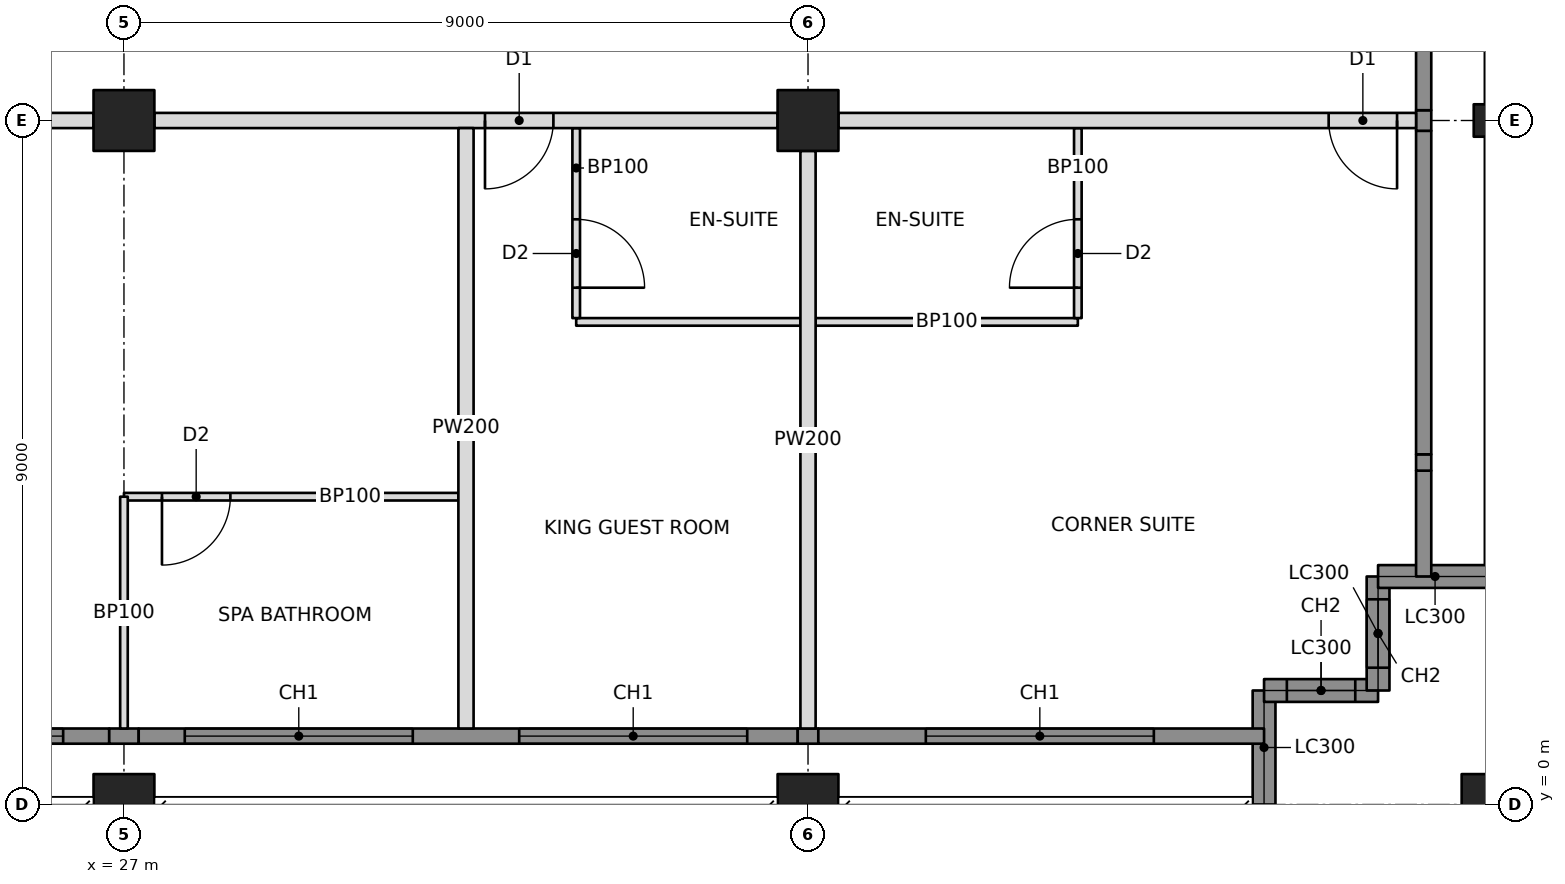
"""IFC4 building model, lengths in metres.
Left out: names, types, materials, properties, quantities, classifications, styles, units other than length and angle.
Written with IfcOpenShell. Run it as: python <this file> out.ifc"""

import sys

from ifc_helpers import new_model, si_unit, direction, frame, frame_2d, origin, origin_2d, place, context, subcontext, project, spatial, rectangle, hollow_rectangle, i_section, extrude, element, fill, save


model = new_model("IFC4")
c1 = context("Model", 3, precision=1e-05, world=origin(), true_north=direction((0.0, 1.0)))
c2 = subcontext(c1, "Body", "Model", "MODEL_VIEW")
j1 = project(units=[si_unit("LENGTHUNIT", "METRE"), si_unit("PLANEANGLEUNIT", "RADIAN")], contexts=[c1])
p1 = place(None, origin())
s1 = spatial("IfcSite", under=j1, at=p1, CompositionType="ELEMENT")
p2 = place(p1, origin())
s2 = spatial("IfcBuilding", under=s1, at=p2, CompositionType="ELEMENT")
p3 = place(p2, frame((0.0, 0.0, 204.6)))
s3 = spatial("IfcBuildingStorey", under=s2, at=p3, CompositionType="ELEMENT", Elevation=204.6)
p4 = place(p3, frame((27.0, 0.0, 0.0), z_axis=(0.0, 0.0, 1.0), x_axis=(1.0, 0.0, 0.0)))
e1 = element("IfcColumn", 1, at=p4, inside=s3, PredefinedType="COLUMN", context=c2, shape_type="SweptSolid", body=[
    extrude(hollow_rectangle(XDim=0.8, YDim=0.8, WallThickness=0.06, at=origin_2d()), origin(), (0.0, 0.0, 1.0), 3.4),
])
p5 = place(p3, frame((27.0, 9.0, 0.0), z_axis=(0.0, 0.0, 1.0), x_axis=(1.0, 0.0, 0.0)))
e2 = element("IfcColumn", 2, at=p5, inside=s3, PredefinedType="COLUMN", context=c2, shape_type="SweptSolid", body=[
    extrude(hollow_rectangle(XDim=0.8, YDim=0.8, WallThickness=0.05, at=origin_2d()), origin(), (0.0, 0.0, 1.0), 3.4),
])
p6 = place(p3, frame((36.0, 0.0, 0.0), z_axis=(0.0, 0.0, 1.0), x_axis=(1.0, 0.0, 0.0)))
e3 = element("IfcColumn", 3, at=p6, inside=s3, PredefinedType="COLUMN", context=c2, shape_type="SweptSolid", body=[
    extrude(hollow_rectangle(XDim=0.8, YDim=0.8, WallThickness=0.06, at=origin_2d()), origin(), (0.0, 0.0, 1.0), 3.4),
])
p7 = place(p3, frame((36.0, 9.0, 0.0), z_axis=(0.0, 0.0, 1.0), x_axis=(0.0, 1.0, 0.0)))
e4 = element("IfcColumn", 4, at=p7, inside=s3, PredefinedType="COLUMN", context=c2, shape_type="SweptSolid", body=[
    extrude(hollow_rectangle(XDim=0.8, YDim=0.8, WallThickness=0.05, at=origin_2d()), origin(), (0.0, 0.0, 1.0), 3.4),
])
p8 = place(p3, frame((45.0, 0.0, 0.0), z_axis=(0.0, 0.0, 1.0), x_axis=(1.0, 0.0, 0.0)))
e5 = element("IfcColumn", 5, at=p8, inside=s3, PredefinedType="COLUMN", context=c2, shape_type="SweptSolid", body=[
    extrude(hollow_rectangle(XDim=0.8, YDim=0.8, WallThickness=0.06, at=origin_2d()), origin(), (0.0, 0.0, 1.0), 3.4),
])
p9 = place(p3, frame((45.0, 9.0, 0.0), z_axis=(0.0, 0.0, 1.0), x_axis=(0.0, 1.0, 0.0)))
e6 = element("IfcColumn", 6, at=p9, inside=s3, PredefinedType="COLUMN", context=c2, shape_type="SweptSolid", body=[
    extrude(i_section(OverallWidth=0.427, OverallDepth=0.483, WebThickness=0.051, FlangeThickness=0.082, at=origin_2d()), origin(), (0.0, 0.0, 1.0), 3.4),
])
p10 = place(p3, frame((42.0, 0.0, 0.0), z_axis=(0.0, 0.0, 1.0), x_axis=(0.0, 1.0, 0.0)))
e7 = element("IfcWall", 7, at=p10, inside=s3, PredefinedType="SOLIDWALL", context=c2, shape_type="SweptSolid", body=[
    extrude(rectangle(XDim=1.5, YDim=0.3, at=frame_2d((0.75, 0.0))), origin(), (0.0, 0.0, 1.0), 2.42),
])
p11 = place(p3, frame((42.0, 1.5, 0.0), z_axis=(0.0, 0.0, 1.0), x_axis=(1.0, 0.0, 0.0)))
e8 = element("IfcWall", 8, at=p11, inside=s3, PredefinedType="SOLIDWALL", context=c2, shape_type="SweptSolid", body=[
    extrude(rectangle(XDim=1.5, YDim=0.3, at=frame_2d((0.75, 0.0))), origin(), (0.0, 0.0, 1.0), 3.2),
])
p12 = place(p11, frame((0.3, 0.0, 0.6)))
e9 = element("IfcOpeningElement", 9, at=p12, cuts=e8, PredefinedType="OPENING", context=c2, shape_type="SweptSolid", body=[
    extrude(rectangle(XDim=0.9, YDim=2.2, at=frame_2d((0.45, 1.1))), frame((0.0, 0.16, 0.0), z_axis=(0.0, -1.0, 0.0), x_axis=(1.0, 0.0, 0.0)), (0.0, 0.0, 1.0), 0.32),
])
p13 = place(p3, frame((43.5, 1.5, 0.0), z_axis=(0.0, 0.0, 1.0), x_axis=(0.0, 1.0, 0.0)))
e10 = element("IfcWall", 10, at=p13, inside=s3, PredefinedType="SOLIDWALL", context=c2, shape_type="SweptSolid", body=[
    extrude(rectangle(XDim=1.5, YDim=0.3, at=frame_2d((0.75, 0.0))), origin(), (0.0, 0.0, 1.0), 3.2),
])
p14 = place(p13, frame((0.3, 0.0, 0.6)))
e11 = element("IfcOpeningElement", 11, at=p14, cuts=e10, PredefinedType="OPENING", context=c2, shape_type="SweptSolid", body=[
    extrude(rectangle(XDim=0.9, YDim=2.2, at=frame_2d((0.45, 1.1))), frame((0.0, 0.16, 0.0), z_axis=(0.0, -1.0, 0.0), x_axis=(1.0, 0.0, 0.0)), (0.0, 0.0, 1.0), 0.32),
])
p15 = place(p3, frame((43.5, 3.0, 0.0), z_axis=(0.0, 0.0, 1.0), x_axis=(1.0, 0.0, 0.0)))
e12 = element("IfcWall", 12, at=p15, inside=s3, PredefinedType="SOLIDWALL", context=c2, shape_type="SweptSolid", body=[
    extrude(rectangle(XDim=1.5, YDim=0.3, at=frame_2d((0.75, 0.0))), origin(), (0.0, 0.0, 1.0), 2.42),
])
p16 = place(p3, frame((44.1, 3.0, 0.0), z_axis=(0.0, 0.0, 1.0), x_axis=(0.0, 1.0, 0.0)))
e13 = element("IfcWall", 13, at=p16, inside=s3, PredefinedType="SOLIDWALL", context=c2, shape_type="SweptSolid", body=[
    extrude(rectangle(XDim=1.393, YDim=0.2, at=frame_2d((0.696, 0.0))), origin(), (0.0, 0.0, 1.0), 3.2),
])
p17 = place(p3, frame((18.4, 9.0, 0.0), z_axis=(0.0, 0.0, 1.0), x_axis=(1.0, 0.0, 0.0)))
e14 = element("IfcWall", 14, at=p17, inside=s3, PredefinedType="PARTITIONING", context=c2, shape_type="SweptSolid", body=[
    extrude(rectangle(XDim=8.2, YDim=0.2, at=frame_2d((4.1, 0.0))), origin(), (0.0, 0.0, 1.0), 2.405),
])
p18 = place(p17, frame((4.35, 0.0, 0.0)))
e15 = element("IfcOpeningElement", 15, at=p18, cuts=e14, PredefinedType="OPENING", context=c2, shape_type="SweptSolid", body=[
    extrude(rectangle(XDim=0.9, YDim=2.1, at=frame_2d((0.45, 1.05))), frame((0.0, 0.11, 0.0), z_axis=(0.0, -1.0, 0.0), x_axis=(1.0, 0.0, 0.0)), (0.0, 0.0, 1.0), 0.22),
])
p19 = place(p3, frame((27.4, 9.0, 0.0), z_axis=(0.0, 0.0, 1.0), x_axis=(1.0, 0.0, 0.0)))
e16 = element("IfcWall", 16, at=p19, inside=s3, PredefinedType="PARTITIONING", context=c2, shape_type="SweptSolid", body=[
    extrude(rectangle(XDim=8.2, YDim=0.2, at=frame_2d((4.1, 0.0))), origin(), (0.0, 0.0, 1.0), 2.405),
])
p20 = place(p19, frame((4.35, 0.0, 0.0)))
e17 = element("IfcOpeningElement", 17, at=p20, cuts=e16, PredefinedType="OPENING", context=c2, shape_type="SweptSolid", body=[
    extrude(rectangle(XDim=0.9, YDim=2.1, at=frame_2d((0.45, 1.05))), frame((0.0, 0.11, 0.0), z_axis=(0.0, -1.0, 0.0), x_axis=(1.0, 0.0, 0.0)), (0.0, 0.0, 1.0), 0.22),
])
p21 = place(p3, frame((36.4, 9.0, 0.0), z_axis=(0.0, 0.0, 1.0), x_axis=(1.0, 0.0, 0.0)))
e18 = element("IfcWall", 18, at=p21, inside=s3, PredefinedType="PARTITIONING", context=c2, shape_type="SweptSolid", body=[
    extrude(rectangle(XDim=7.6, YDim=0.2, at=frame_2d((3.8, 0.0))), origin(), (0.0, 0.0, 1.0), 2.438),
])
p22 = place(p21, frame((6.45, 0.0, 0.0)))
e19 = element("IfcOpeningElement", 19, at=p22, cuts=e18, PredefinedType="OPENING", context=c2, shape_type="SweptSolid", body=[
    extrude(rectangle(XDim=0.9, YDim=2.1, at=frame_2d((0.45, 1.05))), frame((0.0, 0.11, 0.0), z_axis=(0.0, -1.0, 0.0), x_axis=(1.0, 0.0, 0.0)), (0.0, 0.0, 1.0), 0.22),
])
p23 = place(p3, frame((31.5, 8.9, 0.0), z_axis=(0.0, 0.0, 1.0), x_axis=(0.0, -1.0, 0.0)))
e20 = element("IfcWall", 20, at=p23, inside=s3, PredefinedType="PARTITIONING", context=c2, shape_type="SweptSolid", body=[
    extrude(rectangle(XDim=7.9, YDim=0.2, at=frame_2d((3.95, 0.0))), origin(), (0.0, 0.0, 1.0), 2.404),
])
p24 = place(p3, frame((36.0, 8.6, 0.0), z_axis=(0.0, 0.0, 1.0), x_axis=(0.0, -1.0, 0.0)))
e21 = element("IfcWall", 21, at=p24, inside=s3, PredefinedType="PARTITIONING", context=c2, shape_type="SweptSolid", body=[
    extrude(rectangle(XDim=7.6, YDim=0.2, at=frame_2d((3.8, 0.0))), origin(), (0.0, 0.0, 1.0), 2.438),
])
p25 = place(p3, frame((27.0, 4.05, 0.0), z_axis=(0.0, 0.0, 1.0), x_axis=(1.0, 0.0, 0.0)))
e22 = element("IfcWall", 22, at=p25, inside=s3, PredefinedType="PARTITIONING", context=c2, shape_type="SweptSolid", body=[
    extrude(rectangle(XDim=4.4, YDim=0.1, at=frame_2d((2.2, 0.0))), origin(), (0.0, 0.0, 1.0), 2.404),
])
p26 = place(p25, frame((0.5, 0.0, 0.0)))
e23 = element("IfcOpeningElement", 23, at=p26, cuts=e22, PredefinedType="OPENING", context=c2, shape_type="SweptSolid", body=[
    extrude(rectangle(XDim=0.9, YDim=2.1, at=frame_2d((0.45, 1.05))), frame((0.0, 0.06, 0.0), z_axis=(0.0, -1.0, 0.0), x_axis=(1.0, 0.0, 0.0)), (0.0, 0.0, 1.0), 0.12),
])
p27 = place(p3, frame((27.0, 4.05, 0.0), z_axis=(0.0, 0.0, 1.0), x_axis=(0.0, -1.0, 0.0)))
e24 = element("IfcWall", 24, at=p27, inside=s3, PredefinedType="PARTITIONING", context=c2, shape_type="SweptSolid", body=[
    extrude(rectangle(XDim=3.05, YDim=0.1, at=frame_2d((1.525, 0.0))), origin(), (0.0, 0.0, 1.0), 2.405),
])
p28 = place(p3, frame((32.95, 6.35, 0.0), z_axis=(0.0, 0.0, 1.0), x_axis=(1.0, 0.0, 0.0)))
e25 = element("IfcWall", 25, at=p28, inside=s3, PredefinedType="PARTITIONING", context=c2, shape_type="SweptSolid", body=[
    extrude(rectangle(XDim=2.95, YDim=0.1, at=frame_2d((1.475, 0.0))), origin(), (0.0, 0.0, 1.0), 2.438),
])
p29 = place(p3, frame((32.95, 8.9, 0.0), z_axis=(0.0, 0.0, 1.0), x_axis=(0.0, -1.0, 0.0)))
e26 = element("IfcWall", 26, at=p29, inside=s3, PredefinedType="PARTITIONING", context=c2, shape_type="SweptSolid", body=[
    extrude(rectangle(XDim=2.5, YDim=0.1, at=frame_2d((1.25, 0.0))), origin(), (0.0, 0.0, 1.0), 2.404),
])
p30 = place(p29, frame((1.2, 0.0, 0.0)))
e27 = element("IfcOpeningElement", 27, at=p30, cuts=e26, PredefinedType="OPENING", context=c2, shape_type="SweptSolid", body=[
    extrude(rectangle(XDim=0.9, YDim=2.1, at=frame_2d((0.45, 1.05))), frame((0.0, 0.06, 0.0), z_axis=(0.0, -1.0, 0.0), x_axis=(1.0, 0.0, 0.0)), (0.0, 0.0, 1.0), 0.12),
])
p31 = place(p3, frame((36.1, 6.35, 0.0), z_axis=(0.0, 0.0, 1.0), x_axis=(1.0, 0.0, 0.0)))
e28 = element("IfcWall", 28, at=p31, inside=s3, PredefinedType="PARTITIONING", context=c2, shape_type="SweptSolid", body=[
    extrude(rectangle(XDim=3.45, YDim=0.1, at=frame_2d((1.725, 0.0))), origin(), (0.0, 0.0, 1.0), 2.438),
])
p32 = place(p3, frame((39.55, 8.9, 0.0), z_axis=(0.0, 0.0, 1.0), x_axis=(0.0, -1.0, 0.0)))
e29 = element("IfcWall", 29, at=p32, inside=s3, PredefinedType="PARTITIONING", context=c2, shape_type="SweptSolid", body=[
    extrude(rectangle(XDim=2.5, YDim=0.1, at=frame_2d((1.25, 0.0))), origin(), (0.0, 0.0, 1.0), 2.438),
])
p33 = place(p32, frame((1.2, 0.0, 0.0)))
e30 = element("IfcOpeningElement", 30, at=p33, cuts=e29, PredefinedType="OPENING", context=c2, shape_type="SweptSolid", body=[
    extrude(rectangle(XDim=0.9, YDim=2.1, at=frame_2d((0.45, 1.05))), frame((0.0, 0.06, 0.0), z_axis=(0.0, -1.0, 0.0), x_axis=(1.0, 0.0, 0.0)), (0.0, 0.0, 1.0), 0.12),
])
p34 = place(p3, frame((18.194, 0.9, 0.0), z_axis=(0.0, 0.0, 1.0), x_axis=(1.0, 0.0, 0.0)))
e31 = element("IfcWall", 31, at=p34, inside=s3, PredefinedType="SOLIDWALL", context=c2, shape_type="SweptSolid", body=[
    extrude(rectangle(XDim=8.612, YDim=0.2, at=frame_2d((4.306, 0.0))), origin(), (0.0, 0.0, 1.0), 3.2),
])
p35 = place(p34, frame((0.606, 0.0, 0.6)))
e32 = element("IfcOpeningElement", 32, at=p35, cuts=e31, PredefinedType="OPENING", context=c2, shape_type="SweptSolid", body=[
    extrude(rectangle(XDim=3.0, YDim=2.2, at=frame_2d((1.5, 1.1))), frame((0.0, 0.11, 0.0), z_axis=(0.0, -1.0, 0.0), x_axis=(1.0, 0.0, 0.0)), (0.0, 0.0, 1.0), 0.22),
])
p36 = place(p34, frame((5.006, 0.0, 0.6)))
e33 = element("IfcOpeningElement", 33, at=p36, cuts=e31, PredefinedType="OPENING", context=c2, shape_type="SweptSolid", body=[
    extrude(rectangle(XDim=3.0, YDim=2.2, at=frame_2d((1.5, 1.1))), frame((0.0, 0.11, 0.0), z_axis=(0.0, -1.0, 0.0), x_axis=(1.0, 0.0, 0.0)), (0.0, 0.0, 1.0), 0.22),
])
p37 = place(p3, frame((26.806, 0.9, 0.0), z_axis=(0.0, 0.0, 1.0), x_axis=(1.0, 0.0, 0.0)))
e34 = element("IfcWall", 34, at=p37, inside=s3, PredefinedType="SOLIDWALL", context=c2, shape_type="SweptSolid", body=[
    extrude(rectangle(XDim=0.388, YDim=0.2, at=frame_2d((0.194, 0.0))), origin(), (0.0, 0.0, 1.0), 2.404),
])
p38 = place(p3, frame((27.194, 0.9, 0.0), z_axis=(0.0, 0.0, 1.0), x_axis=(1.0, 0.0, 0.0)))
e35 = element("IfcWall", 35, at=p38, inside=s3, PredefinedType="SOLIDWALL", context=c2, shape_type="SweptSolid", body=[
    extrude(rectangle(XDim=8.671, YDim=0.2, at=frame_2d((4.335, 0.0))), origin(), (0.0, 0.0, 1.0), 3.2),
])
p39 = place(p38, frame((0.606, 0.0, 0.6)))
e36 = element("IfcOpeningElement", 36, at=p39, cuts=e35, PredefinedType="OPENING", context=c2, shape_type="SweptSolid", body=[
    extrude(rectangle(XDim=3.0, YDim=2.2, at=frame_2d((1.5, 1.1))), frame((0.0, 0.11, 0.0), z_axis=(0.0, -1.0, 0.0), x_axis=(1.0, 0.0, 0.0)), (0.0, 0.0, 1.0), 0.22),
])
p40 = place(p38, frame((5.006, 0.0, 0.6)))
e37 = element("IfcOpeningElement", 37, at=p40, cuts=e35, PredefinedType="OPENING", context=c2, shape_type="SweptSolid", body=[
    extrude(rectangle(XDim=3.0, YDim=2.2, at=frame_2d((1.5, 1.1))), frame((0.0, 0.11, 0.0), z_axis=(0.0, -1.0, 0.0), x_axis=(1.0, 0.0, 0.0)), (0.0, 0.0, 1.0), 0.22),
])
p41 = place(p3, frame((35.865, 0.9, 0.0), z_axis=(0.0, 0.0, 1.0), x_axis=(1.0, 0.0, 0.0)))
e38 = element("IfcWall", 38, at=p41, inside=s3, PredefinedType="SOLIDWALL", context=c2, shape_type="SweptSolid", body=[
    extrude(rectangle(XDim=0.271, YDim=0.2, at=frame_2d((0.135, 0.0))), origin(), (0.0, 0.0, 1.0), 2.438),
])
p42 = place(p3, frame((36.135, 0.9, 0.0), z_axis=(0.0, 0.0, 1.0), x_axis=(1.0, 0.0, 0.0)))
e39 = element("IfcWall", 39, at=p42, inside=s3, PredefinedType="SOLIDWALL", context=c2, shape_type="SweptSolid", body=[
    extrude(rectangle(XDim=5.865, YDim=0.2, at=frame_2d((2.932, 0.0))), origin(), (0.0, 0.0, 1.0), 3.2),
])
p43 = place(p42, frame((1.415, 0.0, 0.6)))
e40 = element("IfcOpeningElement", 40, at=p43, cuts=e39, PredefinedType="OPENING", context=c2, shape_type="SweptSolid", body=[
    extrude(rectangle(XDim=3.0, YDim=2.2, at=frame_2d((1.5, 1.1))), frame((0.0, 0.11, 0.0), z_axis=(0.0, -1.0, 0.0), x_axis=(1.0, 0.0, 0.0)), (0.0, 0.0, 1.0), 0.22),
])
p44 = place(p3, frame((44.1, 4.393, 0.0), z_axis=(0.0, 0.0, 1.0), x_axis=(0.0, 1.0, 0.0)))
e41 = element("IfcWall", 41, at=p44, inside=s3, PredefinedType="SOLIDWALL", context=c2, shape_type="SweptSolid", body=[
    extrude(rectangle(XDim=0.215, YDim=0.2, at=frame_2d((0.107, 0.0))), origin(), (0.0, 0.0, 1.0), 2.661),
])
p45 = place(p3, frame((44.1, 4.607, 0.0), z_axis=(0.0, 0.0, 1.0), x_axis=(0.0, 1.0, 0.0)))
e42 = element("IfcWall", 42, at=p45, inside=s3, PredefinedType="SOLIDWALL", context=c2, shape_type="SweptSolid", body=[
    extrude(rectangle(XDim=4.257, YDim=0.2, at=frame_2d((2.129, 0.0))), origin(), (0.0, 0.0, 1.0), 3.2),
])
p46 = place(p3, frame((44.1, 8.865, 0.0), z_axis=(0.0, 0.0, 1.0), x_axis=(0.0, 1.0, 0.0)))
e43 = element("IfcWall", 43, at=p46, inside=s3, PredefinedType="SOLIDWALL", context=c2, shape_type="SweptSolid", body=[
    extrude(rectangle(XDim=0.271, YDim=0.2, at=frame_2d((0.135, 0.0))), origin(), (0.0, 0.0, 1.0), 2.438),
])
p47 = place(p3, frame((44.1, 9.135, 0.0), z_axis=(0.0, 0.0, 1.0), x_axis=(0.0, 1.0, 0.0)))
e44 = element("IfcWall", 44, at=p47, inside=s3, PredefinedType="SOLIDWALL", context=c2, shape_type="SweptSolid", body=[
    extrude(rectangle(XDim=8.671, YDim=0.2, at=frame_2d((4.335, 0.0))), origin(), (0.0, 0.0, 1.0), 3.2),
])
p48 = place(p47, frame((2.015, 0.0, 0.6)))
e45 = element("IfcOpeningElement", 45, at=p48, cuts=e44, PredefinedType="OPENING", context=c2, shape_type="SweptSolid", body=[
    extrude(rectangle(XDim=3.0, YDim=2.2, at=frame_2d((1.5, 1.1))), frame((0.0, 0.11, 0.0), z_axis=(0.0, -1.0, 0.0), x_axis=(1.0, 0.0, 0.0)), (0.0, 0.0, 1.0), 0.22),
])
p49 = place(p47, frame((5.515, 0.0, 0.6)))
e46 = element("IfcOpeningElement", 46, at=p49, cuts=e44, PredefinedType="OPENING", context=c2, shape_type="SweptSolid", body=[
    extrude(rectangle(XDim=3.0, YDim=2.2, at=frame_2d((1.5, 1.1))), frame((0.0, 0.11, 0.0), z_axis=(0.0, -1.0, 0.0), x_axis=(1.0, 0.0, 0.0)), (0.0, 0.0, 1.0), 0.22),
])
p50 = place(p12, origin())
e47 = element("IfcWindow", 47, at=p50, inside=s3, PartitioningType="SINGLE_PANEL", PredefinedType="WINDOW", context=c2, shape_type="SweptSolid", body=[
    extrude(rectangle(XDim=0.9, YDim=2.2, at=frame_2d((0.45, 1.1))), frame((0.0, 0.03, 0.0), z_axis=(0.0, -1.0, 0.0), x_axis=(1.0, 0.0, 0.0)), (0.0, 0.0, 1.0), 0.06),
])
fill(e9, e47)
p51 = place(p14, origin())
e48 = element("IfcWindow", 48, at=p51, inside=s3, PartitioningType="SINGLE_PANEL", PredefinedType="WINDOW", context=c2, shape_type="SweptSolid", body=[
    extrude(rectangle(XDim=0.9, YDim=2.2, at=frame_2d((0.45, 1.1))), frame((0.0, 0.03, 0.0), z_axis=(0.0, -1.0, 0.0), x_axis=(1.0, 0.0, 0.0)), (0.0, 0.0, 1.0), 0.06),
])
fill(e11, e48)
p52 = place(p36, origin())
e49 = element("IfcWindow", 49, at=p52, inside=s3, PartitioningType="TRIPLE_PANEL_VERTICAL", PredefinedType="WINDOW", context=c2, shape_type="SweptSolid", body=[
    extrude(rectangle(XDim=3.0, YDim=2.2, at=frame_2d((1.5, 1.1))), frame((0.0, 0.03, 0.0), z_axis=(0.0, -1.0, 0.0), x_axis=(1.0, 0.0, 0.0)), (0.0, 0.0, 1.0), 0.06),
])
fill(e33, e49)
p53 = place(p39, origin())
e50 = element("IfcWindow", 50, at=p53, inside=s3, PartitioningType="TRIPLE_PANEL_VERTICAL", PredefinedType="WINDOW", context=c2, shape_type="SweptSolid", body=[
    extrude(rectangle(XDim=3.0, YDim=2.2, at=frame_2d((1.5, 1.1))), frame((0.0, 0.03, 0.0), z_axis=(0.0, -1.0, 0.0), x_axis=(1.0, 0.0, 0.0)), (0.0, 0.0, 1.0), 0.06),
])
fill(e36, e50)
p54 = place(p40, origin())
e51 = element("IfcWindow", 51, at=p54, inside=s3, PartitioningType="TRIPLE_PANEL_VERTICAL", PredefinedType="WINDOW", context=c2, shape_type="SweptSolid", body=[
    extrude(rectangle(XDim=3.0, YDim=2.2, at=frame_2d((1.5, 1.1))), frame((0.0, 0.03, 0.0), z_axis=(0.0, -1.0, 0.0), x_axis=(1.0, 0.0, 0.0)), (0.0, 0.0, 1.0), 0.06),
])
fill(e37, e51)
p55 = place(p43, origin())
e52 = element("IfcWindow", 52, at=p55, inside=s3, PartitioningType="TRIPLE_PANEL_VERTICAL", PredefinedType="WINDOW", context=c2, shape_type="SweptSolid", body=[
    extrude(rectangle(XDim=3.0, YDim=2.2, at=frame_2d((1.5, 1.1))), frame((0.0, 0.03, 0.0), z_axis=(0.0, -1.0, 0.0), x_axis=(1.0, 0.0, 0.0)), (0.0, 0.0, 1.0), 0.06),
])
fill(e40, e52)
p56 = place(p26, frame((0.9, 0.0, 0.0), z_axis=(0.0, 0.0, 1.0), x_axis=(-1.0, 0.0, 0.0)))
e53 = element("IfcDoor", 53, at=p56, inside=s3, OperationType="SINGLE_SWING_RIGHT", PredefinedType="DOOR", context=c2, shape_type="SweptSolid", body=[
    extrude(rectangle(XDim=0.9, YDim=2.1, at=frame_2d((0.45, 1.05))), frame((0.0, 0.025, 0.0), z_axis=(0.0, -1.0, 0.0), x_axis=(1.0, 0.0, 0.0)), (0.0, 0.0, 1.0), 0.05),
])
fill(e23, e53)
p57 = place(p30, origin())
e54 = element("IfcDoor", 54, at=p57, inside=s3, OperationType="SINGLE_SWING_RIGHT", PredefinedType="DOOR", context=c2, shape_type="SweptSolid", body=[
    extrude(rectangle(XDim=0.9, YDim=2.1, at=frame_2d((0.45, 1.05))), frame((0.0, 0.025, 0.0), z_axis=(0.0, -1.0, 0.0), x_axis=(1.0, 0.0, 0.0)), (0.0, 0.0, 1.0), 0.05),
])
fill(e27, e54)
p58 = place(p20, frame((0.9, 0.0, 0.0), z_axis=(0.0, 0.0, 1.0), x_axis=(-1.0, 0.0, 0.0)))
e55 = element("IfcDoor", 55, at=p58, inside=s3, OperationType="SINGLE_SWING_RIGHT", PredefinedType="DOOR", context=c2, shape_type="SweptSolid", body=[
    extrude(rectangle(XDim=0.9, YDim=2.1, at=frame_2d((0.45, 1.05))), frame((0.0, 0.025, 0.0), z_axis=(0.0, -1.0, 0.0), x_axis=(1.0, 0.0, 0.0)), (0.0, 0.0, 1.0), 0.05),
])
fill(e17, e55)
p59 = place(p33, frame((0.9, 0.0, 0.0), z_axis=(0.0, 0.0, 1.0), x_axis=(-1.0, 0.0, 0.0)))
e56 = element("IfcDoor", 56, at=p59, inside=s3, OperationType="SINGLE_SWING_LEFT", PredefinedType="DOOR", context=c2, shape_type="SweptSolid", body=[
    extrude(rectangle(XDim=0.9, YDim=2.1, at=frame_2d((0.45, 1.05))), frame((0.0, 0.025, 0.0), z_axis=(0.0, -1.0, 0.0), x_axis=(1.0, 0.0, 0.0)), (0.0, 0.0, 1.0), 0.05),
])
fill(e30, e56)
p60 = place(p22, frame((0.9, 0.0, 0.0), z_axis=(0.0, 0.0, 1.0), x_axis=(-1.0, 0.0, 0.0)))
e57 = element("IfcDoor", 57, at=p60, inside=s3, OperationType="SINGLE_SWING_LEFT", PredefinedType="DOOR", context=c2, shape_type="SweptSolid", body=[
    extrude(rectangle(XDim=0.9, YDim=2.1, at=frame_2d((0.45, 1.05))), frame((0.0, 0.025, 0.0), z_axis=(0.0, -1.0, 0.0), x_axis=(1.0, 0.0, 0.0)), (0.0, 0.0, 1.0), 0.05),
])
fill(e19, e57)
save(model, sys.argv[1])
